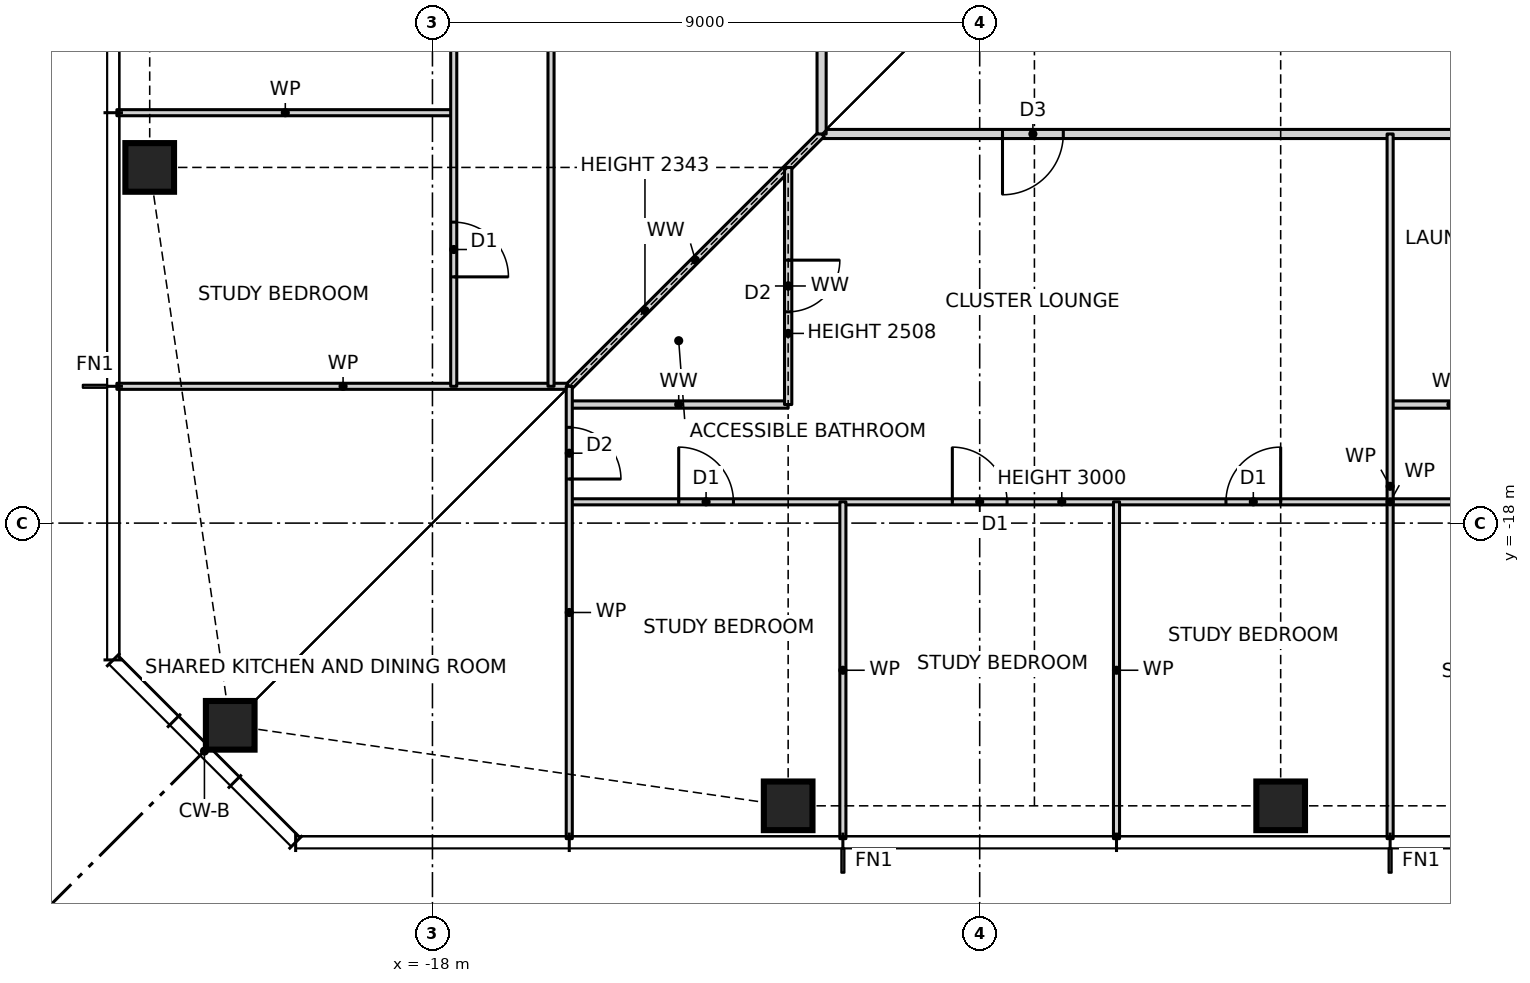
"""IFC4 building model, lengths in metres.
Left out: names, types, materials, properties, quantities, classifications, styles, units other than length and angle.
Written with IfcOpenShell. Run it as: python <this file> out.ifc"""

import sys

from ifc_helpers import new_model, si_unit, direction, frame, frame_2d, origin, origin_2d, place, context, subcontext, project, spatial, rectangle, hollow_rectangle, extrude, element, fill, save


model = new_model("IFC4")
c1 = context("Model", 3, precision=1e-05, world=origin(), true_north=direction((0.0, 1.0)))
c2 = subcontext(c1, "Body", "Model", "MODEL_VIEW")
j1 = project(units=[si_unit("LENGTHUNIT", "METRE"), si_unit("PLANEANGLEUNIT", "RADIAN")], contexts=[c1])
p1 = place(None, origin())
s1 = spatial("IfcSite", under=j1, at=p1, CompositionType="ELEMENT")
p2 = place(p1, origin())
s2 = spatial("IfcBuilding", under=s1, at=p2, CompositionType="ELEMENT")
p3 = place(p2, frame((0.0, 0.0, 39.5)))
s3 = spatial("IfcBuildingStorey", under=s2, at=p3, CompositionType="ELEMENT", Elevation=39.5)
for number, where, z_axis, x_axis in (
    (1, (-21.326, -21.326, 0.0), (0.0, 0.0, 1.0), (1.0, 0.0, 0.0)),
    (2, (-12.15, -22.65, 0.0), (0.0, 0.0, 1.0), (1.0, 0.0, 0.0)),
    (3, (-4.05, -22.65, 0.0), (0.0, 0.0, 1.0), (1.0, 0.0, 0.0)),
    (4, (-22.65, -12.15, 0.0), (0.0, 0.0, 1.0), (1.0, 0.0, 0.0)),
):
    element("IfcColumn", number, at=place(p3, frame(where, z_axis=z_axis, x_axis=x_axis)), inside=s3, PredefinedType="COLUMN", context=c2, shape_type="SweptSolid", body=[
        extrude(hollow_rectangle(XDim=0.8, YDim=0.8, WallThickness=0.09, at=origin_2d()), origin(), (0.0, 0.0, 1.0), 3.5),
    ])
p4 = place(p3, frame((-15.75, -17.65, 0.0), z_axis=(0.0, 0.0, 1.0), x_axis=(1.0, 0.0, 0.0)))
e5 = element("IfcWall", 5, at=p4, inside=s3, PredefinedType="PARTITIONING", context=c2, shape_type="SweptSolid", body=[
    extrude(rectangle(XDim=27.0, YDim=0.1, at=frame_2d((13.5, 0.0))), origin(), (0.0, 0.0, 1.0), 3.0),
])
p5 = place(p4, frame((1.8, 0.0, 0.0)))
e6 = element("IfcOpeningElement", 6, at=p5, cuts=e5, PredefinedType="OPENING", context=c2, shape_type="SweptSolid", body=[
    extrude(rectangle(XDim=0.9, YDim=2.1, at=frame_2d((0.45, 1.05))), frame((0.0, 0.06, 0.0), z_axis=(0.0, -1.0, 0.0), x_axis=(1.0, 0.0, 0.0)), (0.0, 0.0, 1.0), 0.12),
])
p6 = place(p4, frame((6.3, 0.0, 0.0)))
e7 = element("IfcOpeningElement", 7, at=p6, cuts=e5, PredefinedType="OPENING", context=c2, shape_type="SweptSolid", body=[
    extrude(rectangle(XDim=0.9, YDim=2.1, at=frame_2d((0.45, 1.05))), frame((0.0, 0.06, 0.0), z_axis=(0.0, -1.0, 0.0), x_axis=(1.0, 0.0, 0.0)), (0.0, 0.0, 1.0), 0.12),
])
p7 = place(p4, frame((10.8, 0.0, 0.0)))
e8 = element("IfcOpeningElement", 8, at=p7, cuts=e5, PredefinedType="OPENING", context=c2, shape_type="SweptSolid", body=[
    extrude(rectangle(XDim=0.9, YDim=2.1, at=frame_2d((0.45, 1.05))), frame((0.0, 0.06, 0.0), z_axis=(0.0, -1.0, 0.0), x_axis=(1.0, 0.0, 0.0)), (0.0, 0.0, 1.0), 0.12),
])
p8 = place(p4, frame((15.3, 0.0, 0.0)))
e9 = element("IfcOpeningElement", 9, at=p8, cuts=e5, PredefinedType="OPENING", context=c2, shape_type="SweptSolid", body=[
    extrude(rectangle(XDim=0.9, YDim=2.1, at=frame_2d((0.45, 1.05))), frame((0.0, 0.06, 0.0), z_axis=(0.0, -1.0, 0.0), x_axis=(1.0, 0.0, 0.0)), (0.0, 0.0, 1.0), 0.12),
])
p9 = place(p4, frame((19.8, 0.0, 0.0)))
e10 = element("IfcOpeningElement", 10, at=p9, cuts=e5, PredefinedType="OPENING", context=c2, shape_type="SweptSolid", body=[
    extrude(rectangle(XDim=0.9, YDim=2.1, at=frame_2d((0.45, 1.05))), frame((0.0, 0.06, 0.0), z_axis=(0.0, -1.0, 0.0), x_axis=(1.0, 0.0, 0.0)), (0.0, 0.0, 1.0), 0.12),
])
p10 = place(p4, frame((24.3, 0.0, 0.0)))
e11 = element("IfcOpeningElement", 11, at=p10, cuts=e5, PredefinedType="OPENING", context=c2, shape_type="SweptSolid", body=[
    extrude(rectangle(XDim=0.9, YDim=2.1, at=frame_2d((0.45, 1.05))), frame((0.0, 0.06, 0.0), z_axis=(0.0, -1.0, 0.0), x_axis=(1.0, 0.0, 0.0)), (0.0, 0.0, 1.0), 0.12),
])
p11 = place(p3, frame((-15.75, -16.05, 0.0), z_axis=(0.0, 0.0, 1.0), x_axis=(1.0, 0.0, 0.0)))
e12 = element("IfcWall", 12, at=p11, inside=s3, PredefinedType="PARTITIONING", context=c2, shape_type="SweptSolid", body=[
    extrude(rectangle(XDim=3.6, YDim=0.12, at=frame_2d((1.8, 0.0))), origin(), (0.0, 0.0, 1.0), 3.27),
])
p12 = place(p3, frame((-2.25, -16.05, 0.0), z_axis=(0.0, 0.0, 1.0), x_axis=(1.0, 0.0, 0.0)))
e13 = element("IfcWall", 13, at=p12, inside=s3, PredefinedType="PARTITIONING", context=c2, shape_type="SweptSolid", body=[
    extrude(rectangle(XDim=2.0, YDim=0.12, at=frame_2d((1.0, 0.0))), origin(), (0.0, 0.0, 1.0), 3.27),
])
p13 = place(p3, frame((-23.19, -15.75, 0.0), z_axis=(0.0, 0.0, 1.0), x_axis=(1.0, 0.0, 0.0)))
e14 = element("IfcWall", 14, at=p13, inside=s3, PredefinedType="PARTITIONING", context=c2, shape_type="SweptSolid", body=[
    extrude(rectangle(XDim=7.44, YDim=0.1, at=frame_2d((3.72, 0.0))), origin(), (0.0, 0.0, 1.0), 3.27),
])
p14 = place(p3, frame((-11.6, -11.6, 0.0), z_axis=(0.0, 0.0, 1.0), x_axis=(1.0, 0.0, 0.0)))
e15 = element("IfcWall", 15, at=p14, inside=s3, PredefinedType="PARTITIONING", context=c2, shape_type="SweptSolid", body=[
    extrude(rectangle(XDim=23.2, YDim=0.15, at=frame_2d((11.6, 0.0))), origin(), (0.0, 0.0, 1.0), 3.27),
])
p15 = place(p14, frame((2.975, 0.0, 0.0)))
e16 = element("IfcOpeningElement", 16, at=p15, cuts=e15, PredefinedType="OPENING", context=c2, shape_type="SweptSolid", body=[
    extrude(rectangle(XDim=1.0, YDim=2.1, at=frame_2d((0.5, 1.05))), frame((0.0, 0.085, 0.0), z_axis=(0.0, -1.0, 0.0), x_axis=(1.0, 0.0, 0.0)), (0.0, 0.0, 1.0), 0.17),
])
p16 = place(p14, frame((18.6, 0.0, 0.0)))
e17 = element("IfcOpeningElement", 17, at=p16, cuts=e15, PredefinedType="OPENING", context=c2, shape_type="SweptSolid", body=[
    extrude(rectangle(XDim=1.0, YDim=2.1, at=frame_2d((0.5, 1.05))), frame((0.0, 0.085, 0.0), z_axis=(0.0, -1.0, 0.0), x_axis=(1.0, 0.0, 0.0)), (0.0, 0.0, 1.0), 0.17),
])
p17 = place(p3, frame((-23.19, -11.25, 0.0), z_axis=(0.0, 0.0, 1.0), x_axis=(1.0, 0.0, 0.0)))
e18 = element("IfcWall", 18, at=p17, inside=s3, PredefinedType="PARTITIONING", context=c2, shape_type="SweptSolid", body=[
    extrude(rectangle(XDim=5.54, YDim=0.1, at=frame_2d((2.77, 0.0))), origin(), (0.0, 0.0, 1.0), 3.27),
])
p18 = place(p3, frame((-15.75, -15.75, 0.0), z_axis=(0.0, 0.0, 1.0), x_axis=(0.707106781187, 0.707106781187, 0.0)))
e19 = element("IfcWall", 19, at=p18, inside=s3, PredefinedType="PARTITIONING", context=c2, shape_type="SweptSolid", body=[
    extrude(rectangle(XDim=5.869, YDim=0.12, at=frame_2d((2.935, 0.0))), origin(), (0.0, 0.0, 1.0), 2.343),
])
p19 = place(p3, frame((-2.25, -23.19, 0.0), z_axis=(0.0, 0.0, 1.0), x_axis=(0.0, 1.0, 0.0)))
e20 = element("IfcWall", 20, at=p19, inside=s3, PredefinedType="PARTITIONING", context=c2, shape_type="SweptSolid", body=[
    extrude(rectangle(XDim=11.59, YDim=0.1, at=frame_2d((5.795, 0.0))), origin(), (0.0, 0.0, 1.0), 3.27),
])
for number, where, z_axis, x_axis in (
    (21, (-6.75, -23.19, 0.0), (0.0, 0.0, 1.0), (0.0, 1.0, 0.0)),
    (22, (-11.25, -23.19, 0.0), (0.0, 0.0, 1.0), (0.0, 1.0, 0.0)),
):
    element("IfcWall", number, at=place(p3, frame(where, z_axis=z_axis, x_axis=x_axis)), inside=s3, PredefinedType="PARTITIONING", context=c2, shape_type="SweptSolid", body=[
        extrude(rectangle(XDim=5.54, YDim=0.1, at=frame_2d((2.77, 0.0))), origin(), (0.0, 0.0, 1.0), 3.27),
    ])
p20 = place(p3, frame((-11.6, -11.6, 0.0), z_axis=(0.0, 0.0, 1.0), x_axis=(0.0, 1.0, 0.0)))
e23 = element("IfcWall", 23, at=p20, inside=s3, PredefinedType="PARTITIONING", context=c2, shape_type="SweptSolid", body=[
    extrude(rectangle(XDim=24.2, YDim=0.15, at=frame_2d((12.1, 0.0))), origin(), (0.0, 0.0, 1.0), 3.27),
])
p21 = place(p20, frame((12.14, 0.0, 0.0)))
e24 = element("IfcOpeningElement", 24, at=p21, cuts=e23, PredefinedType="OPENING", context=c2, shape_type="SweptSolid", body=[
    extrude(rectangle(XDim=1.0, YDim=2.1, at=frame_2d((0.5, 1.05))), frame((0.0, 0.085, 0.0), z_axis=(0.0, -1.0, 0.0), x_axis=(1.0, 0.0, 0.0)), (0.0, 0.0, 1.0), 0.17),
])
p22 = place(p3, frame((-12.15, -16.05, 0.0), z_axis=(0.0, 0.0, 1.0), x_axis=(0.0, 1.0, 0.0)))
e25 = element("IfcWall", 25, at=p22, inside=s3, PredefinedType="PARTITIONING", context=c2, shape_type="SweptSolid", body=[
    extrude(rectangle(XDim=3.9, YDim=0.12, at=frame_2d((1.95, 0.0))), origin(), (0.0, 0.0, 1.0), 2.508),
])
p23 = place(p22, frame((1.525, 0.0, 0.0)))
e26 = element("IfcOpeningElement", 26, at=p23, cuts=e25, PredefinedType="OPENING", context=c2, shape_type="SweptSolid", body=[
    extrude(rectangle(XDim=0.85, YDim=2.1, at=frame_2d((0.425, 1.05))), frame((0.0, 0.07, 0.0), z_axis=(0.0, -1.0, 0.0), x_axis=(1.0, 0.0, 0.0)), (0.0, 0.0, 1.0), 0.14),
])
p24 = place(p3, frame((-15.75, -23.19, 0.0), z_axis=(0.0, 0.0, 1.0), x_axis=(0.0, 1.0, 0.0)))
e27 = element("IfcWall", 27, at=p24, inside=s3, PredefinedType="PARTITIONING", context=c2, shape_type="SweptSolid", body=[
    extrude(rectangle(XDim=7.44, YDim=0.1, at=frame_2d((3.72, 0.0))), origin(), (0.0, 0.0, 1.0), 3.27),
])
p25 = place(p24, frame((5.915, 0.0, 0.0)))
e28 = element("IfcOpeningElement", 28, at=p25, cuts=e27, PredefinedType="OPENING", context=c2, shape_type="SweptSolid", body=[
    extrude(rectangle(XDim=0.85, YDim=2.1, at=frame_2d((0.425, 1.05))), frame((0.0, 0.06, 0.0), z_axis=(0.0, -1.0, 0.0), x_axis=(1.0, 0.0, 0.0)), (0.0, 0.0, 1.0), 0.12),
])
p26 = place(p3, frame((-16.05, -15.75, 0.0), z_axis=(0.0, 0.0, 1.0), x_axis=(0.0, 1.0, 0.0)))
e29 = element("IfcWall", 29, at=p26, inside=s3, PredefinedType="PARTITIONING", context=c2, shape_type="SweptSolid", body=[
    extrude(rectangle(XDim=14.08, YDim=0.1, at=frame_2d((7.04, 0.0))), origin(), (0.0, 0.0, 1.0), 3.27),
])
p27 = place(p26, frame((6.615, 0.0, 0.0)))
e30 = element("IfcOpeningElement", 30, at=p27, cuts=e29, PredefinedType="OPENING", context=c2, shape_type="SweptSolid", body=[
    extrude(rectangle(XDim=0.85, YDim=2.1, at=frame_2d((0.425, 1.05))), frame((0.0, 0.06, 0.0), z_axis=(0.0, -1.0, 0.0), x_axis=(1.0, 0.0, 0.0)), (0.0, 0.0, 1.0), 0.12),
])
p28 = place(p3, frame((-17.65, -15.75, 0.0), z_axis=(0.0, 0.0, 1.0), x_axis=(0.0, 1.0, 0.0)))
e31 = element("IfcWall", 31, at=p28, inside=s3, PredefinedType="PARTITIONING", context=c2, shape_type="SweptSolid", body=[
    extrude(rectangle(XDim=27.0, YDim=0.1, at=frame_2d((13.5, 0.0))), origin(), (0.0, 0.0, 1.0), 3.27),
])
p29 = place(p28, frame((24.3, 0.0, 0.0)))
e32 = element("IfcOpeningElement", 32, at=p29, cuts=e31, PredefinedType="OPENING", context=c2, shape_type="SweptSolid", body=[
    extrude(rectangle(XDim=0.9, YDim=2.1, at=frame_2d((0.45, 1.05))), frame((0.0, 0.06, 0.0), z_axis=(0.0, -1.0, 0.0), x_axis=(1.0, 0.0, 0.0)), (0.0, 0.0, 1.0), 0.12),
])
p30 = place(p28, frame((19.8, 0.0, 0.0)))
e33 = element("IfcOpeningElement", 33, at=p30, cuts=e31, PredefinedType="OPENING", context=c2, shape_type="SweptSolid", body=[
    extrude(rectangle(XDim=0.9, YDim=2.1, at=frame_2d((0.45, 1.05))), frame((0.0, 0.06, 0.0), z_axis=(0.0, -1.0, 0.0), x_axis=(1.0, 0.0, 0.0)), (0.0, 0.0, 1.0), 0.12),
])
p31 = place(p28, frame((15.3, 0.0, 0.0)))
e34 = element("IfcOpeningElement", 34, at=p31, cuts=e31, PredefinedType="OPENING", context=c2, shape_type="SweptSolid", body=[
    extrude(rectangle(XDim=0.9, YDim=2.1, at=frame_2d((0.45, 1.05))), frame((0.0, 0.06, 0.0), z_axis=(0.0, -1.0, 0.0), x_axis=(1.0, 0.0, 0.0)), (0.0, 0.0, 1.0), 0.12),
])
p32 = place(p28, frame((10.8, 0.0, 0.0)))
e35 = element("IfcOpeningElement", 35, at=p32, cuts=e31, PredefinedType="OPENING", context=c2, shape_type="SweptSolid", body=[
    extrude(rectangle(XDim=0.9, YDim=2.1, at=frame_2d((0.45, 1.05))), frame((0.0, 0.06, 0.0), z_axis=(0.0, -1.0, 0.0), x_axis=(1.0, 0.0, 0.0)), (0.0, 0.0, 1.0), 0.12),
])
p33 = place(p28, frame((6.3, 0.0, 0.0)))
e36 = element("IfcOpeningElement", 36, at=p33, cuts=e31, PredefinedType="OPENING", context=c2, shape_type="SweptSolid", body=[
    extrude(rectangle(XDim=0.9, YDim=2.1, at=frame_2d((0.45, 1.05))), frame((0.0, 0.06, 0.0), z_axis=(0.0, -1.0, 0.0), x_axis=(1.0, 0.0, 0.0)), (0.0, 0.0, 1.0), 0.12),
])
p34 = place(p28, frame((1.8, 0.0, 0.0)))
e37 = element("IfcOpeningElement", 37, at=p34, cuts=e31, PredefinedType="OPENING", context=c2, shape_type="SweptSolid", body=[
    extrude(rectangle(XDim=0.9, YDim=2.1, at=frame_2d((0.45, 1.05))), frame((0.0, 0.06, 0.0), z_axis=(0.0, -1.0, 0.0), x_axis=(1.0, 0.0, 0.0)), (0.0, 0.0, 1.0), 0.12),
])
p35 = place(p5, origin())
e38 = element("IfcDoor", 38, at=p35, inside=s3, OperationType="SINGLE_SWING_LEFT", PredefinedType="DOOR", context=c2, shape_type="SweptSolid", body=[
    extrude(rectangle(XDim=0.9, YDim=2.1, at=frame_2d((0.45, 1.05))), frame((0.0, 0.025, 0.0), z_axis=(0.0, -1.0, 0.0), x_axis=(1.0, 0.0, 0.0)), (0.0, 0.0, 1.0), 0.05),
])
fill(e6, e38)
p36 = place(p6, origin())
e39 = element("IfcDoor", 39, at=p36, inside=s3, OperationType="SINGLE_SWING_LEFT", PredefinedType="DOOR", context=c2, shape_type="SweptSolid", body=[
    extrude(rectangle(XDim=0.9, YDim=2.1, at=frame_2d((0.45, 1.05))), frame((0.0, 0.025, 0.0), z_axis=(0.0, -1.0, 0.0), x_axis=(1.0, 0.0, 0.0)), (0.0, 0.0, 1.0), 0.05),
])
fill(e7, e39)
p37 = place(p7, origin())
e40 = element("IfcDoor", 40, at=p37, inside=s3, OperationType="SINGLE_SWING_RIGHT", PredefinedType="DOOR", context=c2, shape_type="SweptSolid", body=[
    extrude(rectangle(XDim=0.9, YDim=2.1, at=frame_2d((0.45, 1.05))), frame((0.0, 0.025, 0.0), z_axis=(0.0, -1.0, 0.0), x_axis=(1.0, 0.0, 0.0)), (0.0, 0.0, 1.0), 0.05),
])
fill(e8, e40)
p38 = place(p15, frame((1.0, 0.0, 0.0), z_axis=(0.0, 0.0, 1.0), x_axis=(-1.0, 0.0, 0.0)))
e41 = element("IfcDoor", 41, at=p38, inside=s3, OperationType="SINGLE_SWING_RIGHT", PredefinedType="DOOR", context=c2, shape_type="SweptSolid", body=[
    extrude(rectangle(XDim=1.0, YDim=2.1, at=frame_2d((0.5, 1.05))), frame((0.0, 0.025, 0.0), z_axis=(0.0, -1.0, 0.0), x_axis=(1.0, 0.0, 0.0)), (0.0, 0.0, 1.0), 0.05),
])
fill(e16, e41)
p39 = place(p23, frame((0.85, 0.0, 0.0), z_axis=(0.0, 0.0, 1.0), x_axis=(-1.0, 0.0, 0.0)))
e42 = element("IfcDoor", 42, at=p39, inside=s3, OperationType="SINGLE_SWING_LEFT", PredefinedType="DOOR", context=c2, shape_type="SweptSolid", body=[
    extrude(rectangle(XDim=0.85, YDim=2.1, at=frame_2d((0.425, 1.05))), frame((0.0, 0.025, 0.0), z_axis=(0.0, -1.0, 0.0), x_axis=(1.0, 0.0, 0.0)), (0.0, 0.0, 1.0), 0.05),
])
fill(e26, e42)
p40 = place(p34, frame((0.9, 0.0, 0.0), z_axis=(0.0, 0.0, 1.0), x_axis=(-1.0, 0.0, 0.0)))
e43 = element("IfcDoor", 43, at=p40, inside=s3, OperationType="SINGLE_SWING_RIGHT", PredefinedType="DOOR", context=c2, shape_type="SweptSolid", body=[
    extrude(rectangle(XDim=0.9, YDim=2.1, at=frame_2d((0.45, 1.05))), frame((0.0, 0.025, 0.0), z_axis=(0.0, -1.0, 0.0), x_axis=(1.0, 0.0, 0.0)), (0.0, 0.0, 1.0), 0.05),
])
fill(e37, e43)
p41 = place(p25, frame((0.85, 0.0, 0.0), z_axis=(0.0, 0.0, 1.0), x_axis=(-1.0, 0.0, 0.0)))
e44 = element("IfcDoor", 44, at=p41, inside=s3, OperationType="SINGLE_SWING_RIGHT", PredefinedType="DOOR", context=c2, shape_type="SweptSolid", body=[
    extrude(rectangle(XDim=0.85, YDim=2.1, at=frame_2d((0.425, 1.05))), frame((0.0, 0.025, 0.0), z_axis=(0.0, -1.0, 0.0), x_axis=(1.0, 0.0, 0.0)), (0.0, 0.0, 1.0), 0.05),
])
fill(e28, e44)
save(model, sys.argv[1])
